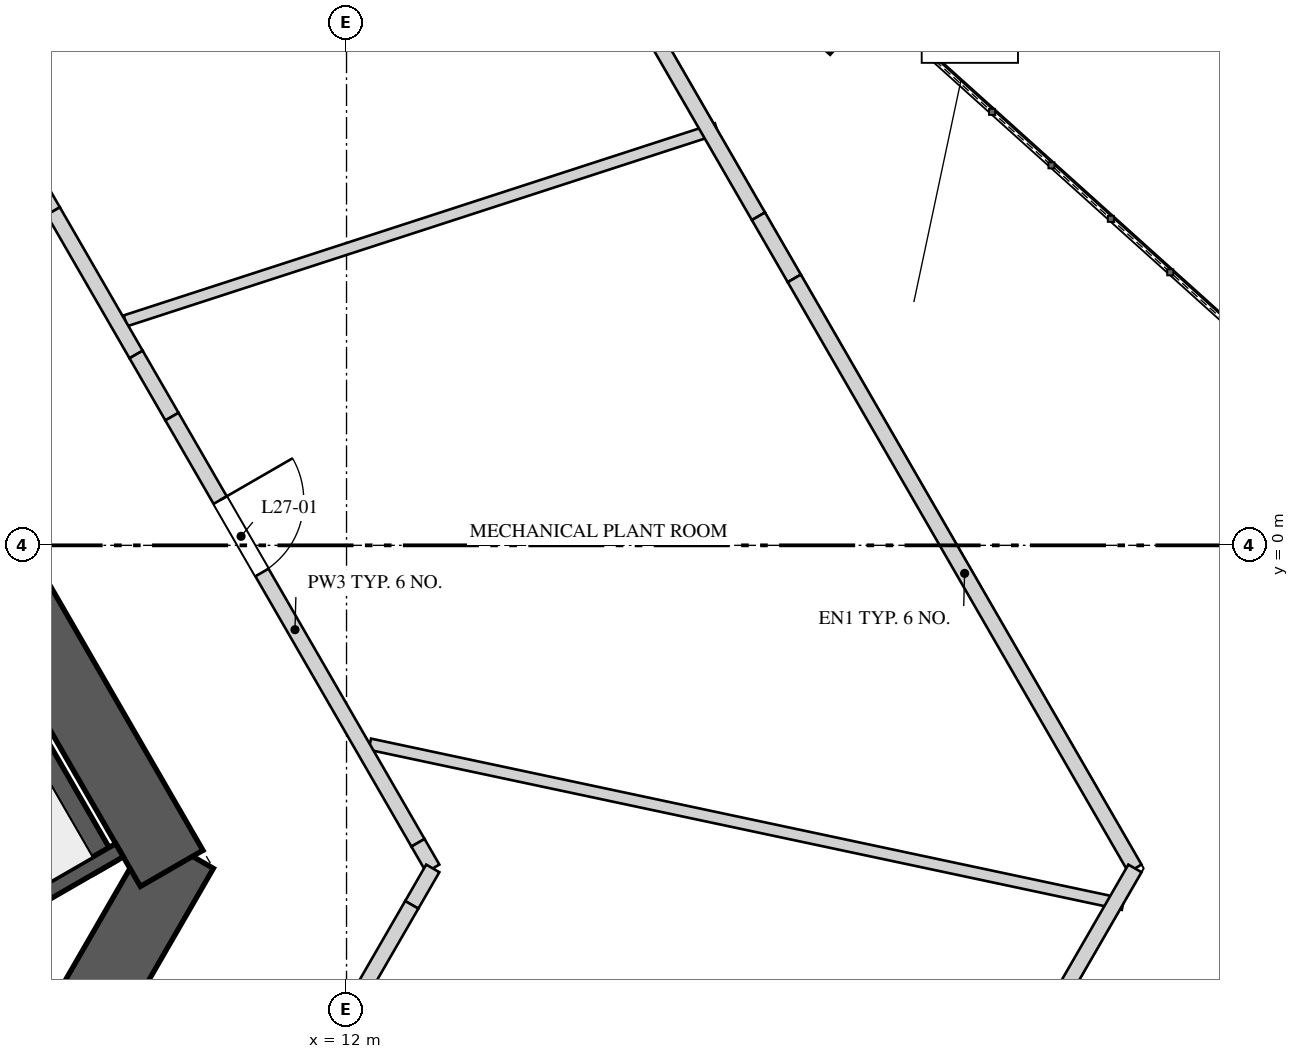
"""IFC4 building model, lengths in metres.
Left out: names, types, materials, properties, quantities, classifications, styles, units other than length and angle.
Written with IfcOpenShell. Run it as: python <this file> out.ifc"""

import sys

from ifc_helpers import new_model, si_unit, direction, frame, frame_2d, origin, origin_2d, place, context, subcontext, project, spatial, rectangle, extrude, element, fill, save


model = new_model("IFC4")
c1 = context("Model", 3, precision=1e-05, world=origin(), true_north=direction((0.0, 1.0)))
c2 = subcontext(c1, "Body", "Model", "MODEL_VIEW")
j1 = project(units=[si_unit("LENGTHUNIT", "METRE"), si_unit("PLANEANGLEUNIT", "RADIAN")], contexts=[c1])
p1 = place(None, origin())
s1 = spatial("IfcSite", under=j1, at=p1, CompositionType="ELEMENT")
p2 = place(p1, origin())
s2 = spatial("IfcBuilding", under=s1, at=p2, CompositionType="ELEMENT")
p3 = place(p2, frame((0.0, 0.0, 120.4)))
s3 = spatial("IfcBuildingStorey", under=s2, at=p3, CompositionType="ELEMENT", Elevation=120.4)
p4 = place(p3, frame((8.393, -6.512, 0.0), z_axis=(0.0, 0.0, 1.0), x_axis=(0.499995765644, 0.866027848477, 0.0)))
e1 = element("IfcWall", 1, at=p4, inside=s3, PredefinedType="SHEAR", context=c2, shape_type="SweptSolid", body=[
    extrude(rectangle(XDim=2.887, YDim=0.95, at=frame_2d((1.443, 0.0))), origin(), (0.0, 0.0, 1.0), 5.2),
])
p5 = place(p3, frame((9.699, -4.25, 0.0), z_axis=(0.0, 0.0, 1.0), x_axis=(-0.499999102847, 0.866025921755, 0.0)))
e2 = element("IfcWall", 2, at=p5, inside=s3, PredefinedType="SHEAR", context=c2, shape_type="SweptSolid", body=[
    extrude(rectangle(XDim=17.061, YDim=0.95, at=frame_2d((8.53, 0.0))), origin(), (0.0, 0.0, 1.0), 5.2),
])
p6 = place(p5, frame((6.805, 0.0, 0.0)))
e3 = element("IfcOpeningElement", 3, at=p6, cuts=e2, PredefinedType="OPENING", context=c2, shape_type="SweptSolid", body=[
    extrude(rectangle(XDim=1.0, YDim=2.4, at=frame_2d((0.5, 1.2))), frame((0.0, 0.485, 0.0), z_axis=(0.0, -1.0, 0.0), x_axis=(1.0, 0.0, 0.0)), (0.0, 0.0, 1.0), 0.97),
])
p7 = place(p5, frame((14.114, 0.0, 0.0)))
e4 = element("IfcOpeningElement", 4, at=p7, cuts=e2, PredefinedType="OPENING", context=c2, shape_type="SweptSolid", body=[
    extrude(rectangle(XDim=0.8, YDim=2.1, at=frame_2d((0.4, 1.05))), frame((0.0, 0.485, 0.0), z_axis=(0.0, -1.0, 0.0), x_axis=(1.0, 0.0, 0.0)), (0.0, 0.0, 1.0), 0.97),
])
p8 = place(p3, frame((18.179, 7.247, 0.0), z_axis=(0.0, 0.0, 1.0), x_axis=(-0.743144825477, 0.669130606359, 0.0)))
e5 = element("IfcColumn", 5, at=p8, inside=s3, PredefinedType="COLUMN", context=c2, shape_type="SweptSolid", body=[
    extrude(rectangle(XDim=1.3, YDim=0.9, at=origin_2d()), origin(), (0.0, 0.0, 1.0), 2.864),
])
p9 = place(p3, frame((8.825, -4.235, 0.0), z_axis=(0.0, 0.0, 1.0), x_axis=(-0.499997426962, 0.866026889324, 0.0)))
e6 = element("IfcWall", 6, at=p9, inside=s3, PredefinedType="SOLIDWALL", context=c2, shape_type="SweptSolid", body=[
    extrude(rectangle(XDim=6.2, YDim=0.35, at=frame_2d((3.1, 0.0))), origin(), (0.0, 0.0, 1.0), 4.85),
])
p10 = place(p3, frame((6.501, -5.461, 0.0), z_axis=(0.0, 0.0, 1.0), x_axis=(0.866032775405, 0.499987231761, 0.0)))
e7 = element("IfcWall", 7, at=p10, inside=s3, PredefinedType="SOLIDWALL", context=c2, shape_type="SweptSolid", body=[
    extrude(rectangle(XDim=2.9, YDim=0.2, at=frame_2d((1.45, 0.0))), origin(), (0.0, 0.0, 1.0), 4.85),
])
p11 = place(p3, frame((9.091, 2.954, 0.0), z_axis=(0.0, 0.0, 1.0), x_axis=(0.951056003265, 0.309018573315, 0.0)))
e8 = element("IfcWall", 8, at=p11, inside=s3, PredefinedType="PARTITIONING", context=c2, shape_type="SweptSolid", body=[
    extrude(rectangle(XDim=8.179, YDim=0.15, at=frame_2d((4.089, 0.0))), origin(), (0.0, 0.0, 1.0), 4.85),
])
p12 = place(p3, frame((22.215, -4.722, 0.0), z_axis=(0.0, 0.0, 1.0), x_axis=(-0.978151622634, 0.207892768365, 0.0)))
e9 = element("IfcWall", 9, at=p12, inside=s3, PredefinedType="PARTITIONING", context=c2, shape_type="SweptSolid", body=[
    extrude(rectangle(XDim=10.13, YDim=0.15, at=frame_2d((5.065, 0.0))), origin(), (0.0, 0.0, 1.0), 4.85),
])
p13 = place(p3, frame((7.742, 5.09, 0.0), z_axis=(0.0, 0.0, 1.0), x_axis=(0.500109828528, -0.865961984968, 0.0)))
e10 = element("IfcWall", 10, at=p13, inside=s3, PredefinedType="SOLIDWALL", context=c2, shape_type="SweptSolid", body=[
    extrude(rectangle(XDim=0.8, YDim=0.2, at=frame_2d((0.4, 0.0))), origin(), (0.0, 0.0, 1.0), 3.95),
])
p14 = place(p3, frame((8.142, 4.397, 0.0), z_axis=(0.0, 0.0, 1.0), x_axis=(0.499948868167, -0.866054922749, 0.0)))
e11 = element("IfcWall", 11, at=p14, inside=s3, PredefinedType="SOLIDWALL", context=c2, shape_type="SweptSolid", body=[
    extrude(rectangle(XDim=2.178, YDim=0.2, at=frame_2d((1.089, 0.0))), origin(), (0.0, 0.0, 1.0), 4.85),
])
p15 = place(p3, frame((9.231, 2.511, 0.0), z_axis=(0.0, 0.0, 1.0), x_axis=(0.500118100521, -0.865957207679, 0.0)))
e12 = element("IfcWall", 12, at=p15, inside=s3, PredefinedType="SOLIDWALL", context=c2, shape_type="SweptSolid", body=[
    extrude(rectangle(XDim=0.944, YDim=0.2, at=frame_2d((0.472, 0.0))), origin(), (0.0, 0.0, 1.0), 3.75),
])
p16 = place(p3, frame((9.703, 1.694, 0.0), z_axis=(0.0, 0.0, 1.0), x_axis=(0.500004272639, -0.866022936961, 0.0)))
e13 = element("IfcWall", 13, at=p16, inside=s3, PredefinedType="SOLIDWALL", context=c2, shape_type="SweptSolid", body=[
    extrude(rectangle(XDim=6.474, YDim=0.2, at=frame_2d((3.237, 0.0))), origin(), (0.0, 0.0, 1.0), 4.85),
])
p17 = place(p16, frame((1.269, 0.0, 0.0)))
e14 = element("IfcOpeningElement", 14, at=p17, cuts=e13, PredefinedType="OPENING", context=c2, shape_type="SweptSolid", body=[
    extrude(rectangle(XDim=1.1, YDim=2.2, at=frame_2d((0.55, 1.1))), frame((0.0, 0.11, 0.0), z_axis=(0.0, -1.0, 0.0), x_axis=(1.0, 0.0, 0.0)), (0.0, 0.0, 1.0), 0.22),
])
p18 = place(p3, frame((12.94, -3.913, 0.0), z_axis=(0.0, 0.0, 1.0), x_axis=(0.499849133735, -0.866112488944, 0.0)))
e15 = element("IfcWall", 15, at=p18, inside=s3, PredefinedType="SOLIDWALL", context=c2, shape_type="SweptSolid", body=[
    extrude(rectangle(XDim=0.389, YDim=0.2, at=frame_2d((0.195, 0.0))), origin(), (0.0, 0.0, 1.0), 3.95),
])
p19 = place(p3, frame((13.135, -4.25, 0.0), z_axis=(0.0, 0.0, 1.0), x_axis=(-0.499887958344, -0.866090081402, 0.0)))
e16 = element("IfcWall", 16, at=p19, inside=s3, PredefinedType="SOLIDWALL", context=c2, shape_type="SweptSolid", body=[
    extrude(rectangle(XDim=0.553, YDim=0.2, at=frame_2d((0.277, 0.0))), origin(), (0.0, 0.0, 1.0), 3.95),
])
p20 = place(p3, frame((12.858, -4.729, 0.0), z_axis=(0.0, 0.0, 1.0), x_axis=(-0.500031425827, -0.866007259314, 0.0)))
e17 = element("IfcWall", 17, at=p20, inside=s3, PredefinedType="SOLIDWALL", context=c2, shape_type="SweptSolid", body=[
    extrude(rectangle(XDim=3.602, YDim=0.2, at=frame_2d((1.801, 0.0))), origin(), (0.0, 0.0, 1.0), 4.85),
])
p21 = place(p20, frame((1.783, 0.0, 0.0)))
e18 = element("IfcOpeningElement", 18, at=p21, cuts=e17, PredefinedType="OPENING", context=c2, shape_type="SweptSolid", body=[
    extrude(rectangle(XDim=1.1, YDim=2.2, at=frame_2d((0.55, 1.1))), frame((0.0, 0.11, 0.0), z_axis=(0.0, -1.0, 0.0), x_axis=(1.0, 0.0, 0.0)), (0.0, 0.0, 1.0), 0.22),
])
p22 = place(p3, frame((15.011, 8.5, 0.0), z_axis=(0.0, 0.0, 1.0), x_axis=(0.499982815096, -0.866035325266, 0.0)))
e19 = element("IfcWall", 19, at=p22, inside=s3, PredefinedType="SOLIDWALL", context=c2, shape_type="SweptSolid", body=[
    extrude(rectangle(XDim=4.816, YDim=0.2, at=frame_2d((2.408, 0.0))), origin(), (0.0, 0.0, 1.0), 4.85),
])
p23 = place(p3, frame((17.419, 4.329, 0.0), z_axis=(0.0, 0.0, 1.0), x_axis=(0.499924048634, -0.866069249885, 0.0)))
e20 = element("IfcWall", 20, at=p23, inside=s3, PredefinedType="SOLIDWALL", context=c2, shape_type="SweptSolid", body=[
    extrude(rectangle(XDim=0.944, YDim=0.2, at=frame_2d((0.472, 0.0))), origin(), (0.0, 0.0, 1.0), 3.75),
])
p24 = place(p3, frame((17.891, 3.512, 0.0), z_axis=(0.0, 0.0, 1.0), x_axis=(0.500006187924, -0.866021831155, 0.0)))
e21 = element("IfcWall", 21, at=p24, inside=s3, PredefinedType="SOLIDWALL", context=c2, shape_type="SweptSolid", body=[
    extrude(rectangle(XDim=8.963, YDim=0.2, at=frame_2d((4.481, 0.0))), origin(), (0.0, 0.0, 1.0), 4.85),
])
p25 = place(p3, frame((22.372, -4.25, 0.0), z_axis=(0.0, 0.0, 1.0), x_axis=(-0.499975232926, -0.866039702589, 0.0)))
e22 = element("IfcWall", 22, at=p25, inside=s3, PredefinedType="SOLIDWALL", context=c2, shape_type="SweptSolid", body=[
    extrude(rectangle(XDim=2.731, YDim=0.2, at=frame_2d((1.366, 0.0))), origin(), (0.0, 0.0, 1.0), 4.85),
])
p26 = place(p17, origin())
e23 = element("IfcDoor", 23, at=p26, inside=s3, OperationType="SINGLE_SWING_LEFT", PredefinedType="DOOR", context=c2, shape_type="SweptSolid", body=[
    extrude(rectangle(XDim=1.1, YDim=2.2, at=frame_2d((0.55, 1.1))), frame((0.0, 0.025, 0.0), z_axis=(0.0, -1.0, 0.0), x_axis=(1.0, 0.0, 0.0)), (0.0, 0.0, 1.0), 0.05),
])
fill(e14, e23)
save(model, sys.argv[1])
